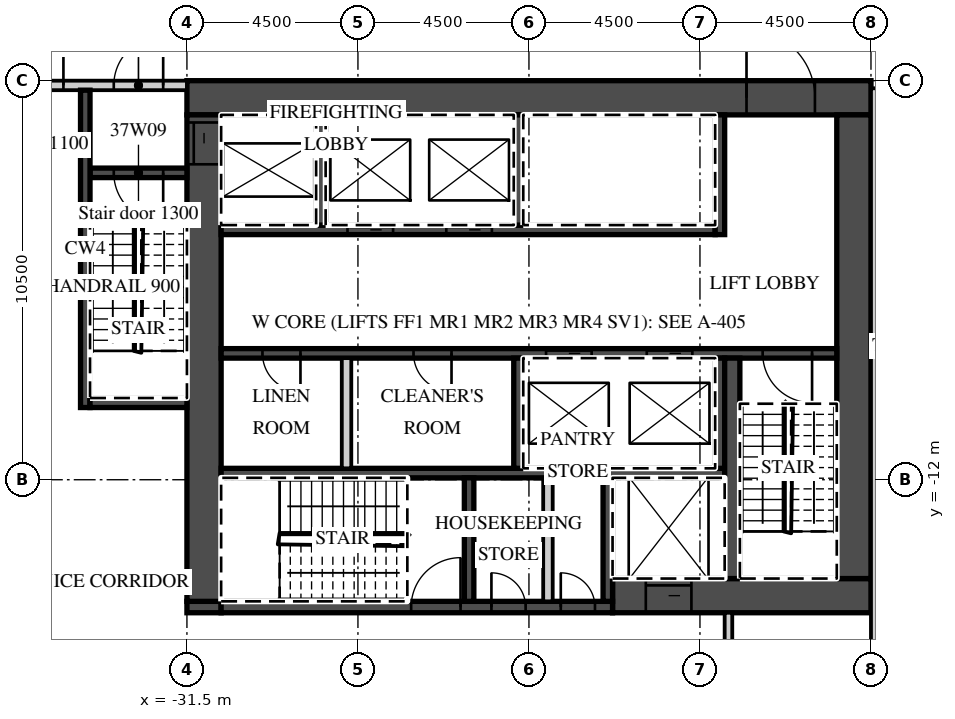
"""IFC4 building model, lengths in metres.
Left out: names, types, materials, properties, quantities, classifications, styles, units other than length and angle.
Written with IfcOpenShell. Run it as: python <this file> out.ifc"""

import sys

from ifc_helpers import new_model, si_unit, direction, frame, frame_2d, origin, place, context, subcontext, project, spatial, rectangle, extrude, element, fill, save


model = new_model("IFC4")
c1 = context("Model", 3, precision=1e-05, world=origin(), true_north=direction((0.0, 1.0)))
c2 = subcontext(c1, "Body", "Model", "MODEL_VIEW")
j1 = project(units=[si_unit("LENGTHUNIT", "METRE"), si_unit("PLANEANGLEUNIT", "RADIAN")], contexts=[c1])
p1 = place(None, origin())
s1 = spatial("IfcSite", under=j1, at=p1, CompositionType="ELEMENT")
p2 = place(p1, origin())
s2 = spatial("IfcBuilding", under=s1, at=p2, CompositionType="ELEMENT")
p3 = place(p2, frame((0.0, 0.0, 162.4)))
s3 = spatial("IfcBuildingStorey", under=s2, at=p3, CompositionType="ELEMENT", Elevation=162.4)
p4 = place(p3, frame((-31.5, -1.95, 0.0), z_axis=(0.0, 0.0, 1.0), x_axis=(1.0, 0.0, 0.0)))
e1 = element("IfcWall", 1, at=p4, inside=s3, PredefinedType="SHEAR", context=c2, shape_type="SweptSolid", body=[
    extrude(rectangle(XDim=18.0, YDim=0.9, at=frame_2d((9.0, 0.0))), origin(), (0.0, 0.0, 1.0), 4.22),
])
p5 = place(p4, frame((14.725, 0.0, 0.0)))
e2 = element("IfcOpeningElement", 2, at=p5, cuts=e1, PredefinedType="OPENING", context=c2, shape_type="SweptSolid", body=[
    extrude(rectangle(XDim=1.8, YDim=2.1, at=frame_2d((0.9, 1.05))), frame((0.0, 0.46, 0.0), z_axis=(0.0, -1.0, 0.0), x_axis=(1.0, 0.0, 0.0)), (0.0, 0.0, 1.0), 0.92),
])
p6 = place(p3, frame((-20.3, -15.05, 0.0), z_axis=(0.0, 0.0, 1.0), x_axis=(1.0, 0.0, 0.0)))
e3 = element("IfcWall", 3, at=p6, inside=s3, PredefinedType="SHEAR", context=c2, shape_type="SweptSolid", body=[
    extrude(rectangle(XDim=6.8, YDim=0.9, at=frame_2d((3.4, 0.0))), origin(), (0.0, 0.0, 1.0), 4.22),
])
p7 = place(p6, frame((0.875, 0.0, 0.0)))
e4 = element("IfcOpeningElement", 4, at=p7, cuts=e3, PredefinedType="OPENING", context=c2, shape_type="SweptSolid", body=[
    extrude(rectangle(XDim=1.2, YDim=2.1, at=frame_2d((0.6, 1.05))), frame((0.0, 0.46, 0.0), z_axis=(0.0, -1.0, 0.0), x_axis=(1.0, 0.0, 0.0)), (0.0, 0.0, 1.0), 0.92),
])
p8 = place(p3, frame((-31.5, -15.35, 0.0), z_axis=(0.0, 0.0, 1.0), x_axis=(1.0, 0.0, 0.0)))
e5 = element("IfcWall", 5, at=p8, inside=s3, PredefinedType="SHEAR", context=c2, shape_type="SweptSolid", body=[
    extrude(rectangle(XDim=0.9, YDim=0.3, at=frame_2d((0.45, 0.0))), origin(), (0.0, 0.0, 1.0), 4.22),
])
p9 = place(p3, frame((-30.6, -15.35, 0.0), z_axis=(0.0, 0.0, 1.0), x_axis=(1.0, 0.0, 0.0)))
e6 = element("IfcWall", 6, at=p9, inside=s3, PredefinedType="SHEAR", context=c2, shape_type="SweptSolid", body=[
    extrude(rectangle(XDim=10.3, YDim=0.3, at=frame_2d((5.15, 0.0))), origin(), (0.0, 0.0, 1.0), 4.22),
])
p10 = place(p9, frame((5.0, 0.0, 0.0)))
e7 = element("IfcOpeningElement", 7, at=p10, cuts=e6, PredefinedType="OPENING", context=c2, shape_type="SweptSolid", body=[
    extrude(rectangle(XDim=1.3, YDim=2.1, at=frame_2d((0.65, 1.05))), frame((0.0, 0.16, 0.0), z_axis=(0.0, -1.0, 0.0), x_axis=(1.0, 0.0, 0.0)), (0.0, 0.0, 1.0), 0.32),
])
p11 = place(p9, frame((7.113, 0.0, 0.0)))
e8 = element("IfcOpeningElement", 8, at=p11, cuts=e6, PredefinedType="OPENING", context=c2, shape_type="SweptSolid", body=[
    extrude(rectangle(XDim=0.9, YDim=2.1, at=frame_2d((0.45, 1.05))), frame((0.0, 0.16, 0.0), z_axis=(0.0, -1.0, 0.0), x_axis=(1.0, 0.0, 0.0)), (0.0, 0.0, 1.0), 0.32),
])
p12 = place(p9, frame((8.938, 0.0, 0.0)))
e9 = element("IfcOpeningElement", 9, at=p12, cuts=e6, PredefinedType="OPENING", context=c2, shape_type="SweptSolid", body=[
    extrude(rectangle(XDim=0.9, YDim=2.1, at=frame_2d((0.45, 1.05))), frame((0.0, 0.16, 0.0), z_axis=(0.0, -1.0, 0.0), x_axis=(1.0, 0.0, 0.0)), (0.0, 0.0, 1.0), 0.32),
])
p13 = place(p3, frame((-31.05, -15.2, 0.0), z_axis=(0.0, 0.0, 1.0), x_axis=(0.0, 1.0, 0.0)))
e10 = element("IfcWall", 10, at=p13, inside=s3, PredefinedType="SHEAR", context=c2, shape_type="SweptSolid", body=[
    extrude(rectangle(XDim=12.8, YDim=0.9, at=frame_2d((6.4, 0.0))), origin(), (0.0, 0.0, 1.0), 4.22),
])
p14 = place(p13, frame((11.5, 0.0, 0.0)))
e11 = element("IfcOpeningElement", 11, at=p14, cuts=e10, PredefinedType="OPENING", context=c2, shape_type="SweptSolid", body=[
    extrude(rectangle(XDim=1.1, YDim=2.1, at=frame_2d((0.55, 1.05))), frame((0.0, 0.46, 0.0), z_axis=(0.0, -1.0, 0.0), x_axis=(1.0, 0.0, 0.0)), (0.0, 0.0, 1.0), 0.92),
])
p15 = place(p3, frame((-13.95, -14.6, 0.0), z_axis=(0.0, 0.0, 1.0), x_axis=(0.0, 1.0, 0.0)))
e12 = element("IfcWall", 12, at=p15, inside=s3, PredefinedType="SHEAR", context=c2, shape_type="SweptSolid", body=[
    extrude(rectangle(XDim=12.2, YDim=0.9, at=frame_2d((6.1, 0.0))), origin(), (0.0, 0.0, 1.0), 4.22),
])
p16 = place(p3, frame((-30.6, -5.425, 0.0), z_axis=(0.0, 0.0, 1.0), x_axis=(1.0, 0.0, 0.0)))
e13 = element("IfcWall", 13, at=p16, inside=s3, PredefinedType="SHEAR", context=c2, shape_type="SweptSolid", body=[
    extrude(rectangle(XDim=13.0, YDim=0.25, at=frame_2d((6.5, 0.0))), origin(), (0.0, 0.0, 1.0), 4.22),
])
p17 = place(p16, frame((3.325, 0.0, 0.0)))
e14 = element("IfcOpeningElement", 14, at=p17, cuts=e13, PredefinedType="OPENING", context=c2, shape_type="SweptSolid", body=[
    extrude(rectangle(XDim=1.2, YDim=2.1, at=frame_2d((0.6, 1.05))), frame((0.0, 0.135, 0.0), z_axis=(0.0, -1.0, 0.0), x_axis=(1.0, 0.0, 0.0)), (0.0, 0.0, 1.0), 0.27),
])
p18 = place(p16, frame((5.925, 0.0, 0.0)))
e15 = element("IfcOpeningElement", 15, at=p18, cuts=e13, PredefinedType="OPENING", context=c2, shape_type="SweptSolid", body=[
    extrude(rectangle(XDim=1.2, YDim=2.1, at=frame_2d((0.6, 1.05))), frame((0.0, 0.135, 0.0), z_axis=(0.0, -1.0, 0.0), x_axis=(1.0, 0.0, 0.0)), (0.0, 0.0, 1.0), 0.27),
])
p19 = place(p3, frame((-17.475, -5.55, 0.0), z_axis=(0.0, 0.0, 1.0), x_axis=(0.0, 1.0, 0.0)))
e16 = element("IfcWall", 16, at=p19, inside=s3, PredefinedType="SHEAR", context=c2, shape_type="SweptSolid", body=[
    extrude(rectangle(XDim=3.15, YDim=0.25, at=frame_2d((1.575, 0.0))), origin(), (0.0, 0.0, 1.0), 4.22),
])
for number, where, z_axis, x_axis in (
    (17, (-27.975, -5.3, 0.0), (0.0, 0.0, 1.0), (0.0, 1.0, 0.0)),
    (18, (-22.775, -5.3, 0.0), (0.0, 0.0, 1.0), (0.0, 1.0, 0.0)),
):
    element("IfcWall", number, at=place(p3, frame(where, z_axis=z_axis, x_axis=x_axis)), inside=s3, PredefinedType="SHEAR", context=c2, shape_type="SweptSolid", body=[
        extrude(rectangle(XDim=2.9, YDim=0.25, at=frame_2d((1.45, 0.0))), origin(), (0.0, 0.0, 1.0), 4.22),
    ])
p20 = place(p3, frame((-30.6, -8.675, 0.0), z_axis=(0.0, 0.0, 1.0), x_axis=(1.0, 0.0, 0.0)))
e19 = element("IfcWall", 19, at=p20, inside=s3, PredefinedType="SHEAR", context=c2, shape_type="SweptSolid", body=[
    extrude(rectangle(XDim=16.2, YDim=0.25, at=frame_2d((8.1, 0.0))), origin(), (0.0, 0.0, 1.0), 4.22),
])
p21 = place(p20, frame((8.55, 0.0, 0.0)))
e20 = element("IfcOpeningElement", 20, at=p21, cuts=e19, PredefinedType="OPENING", context=c2, shape_type="SweptSolid", body=[
    extrude(rectangle(XDim=1.2, YDim=2.1, at=frame_2d((0.6, 1.05))), frame((0.0, 0.135, 0.0), z_axis=(0.0, -1.0, 0.0), x_axis=(1.0, 0.0, 0.0)), (0.0, 0.0, 1.0), 0.27),
])
p22 = place(p20, frame((11.2, 0.0, 0.0)))
e21 = element("IfcOpeningElement", 21, at=p22, cuts=e19, PredefinedType="OPENING", context=c2, shape_type="SweptSolid", body=[
    extrude(rectangle(XDim=1.2, YDim=2.1, at=frame_2d((0.6, 1.05))), frame((0.0, 0.135, 0.0), z_axis=(0.0, -1.0, 0.0), x_axis=(1.0, 0.0, 0.0)), (0.0, 0.0, 1.0), 0.27),
])
p23 = place(p20, frame((14.25, 0.0, 0.0)))
e22 = element("IfcOpeningElement", 22, at=p23, cuts=e19, PredefinedType="OPENING", context=c2, shape_type="SweptSolid", body=[
    extrude(rectangle(XDim=1.3, YDim=2.1, at=frame_2d((0.65, 1.05))), frame((0.0, 0.135, 0.0), z_axis=(0.0, -1.0, 0.0), x_axis=(1.0, 0.0, 0.0)), (0.0, 0.0, 1.0), 0.27),
])
p24 = place(p20, frame((1.087, 0.0, 0.0)))
e23 = element("IfcOpeningElement", 23, at=p24, cuts=e19, PredefinedType="OPENING", context=c2, shape_type="SweptSolid", body=[
    extrude(rectangle(XDim=1.0, YDim=2.1, at=frame_2d((0.5, 1.05))), frame((0.0, 0.135, 0.0), z_axis=(0.0, -1.0, 0.0), x_axis=(1.0, 0.0, 0.0)), (0.0, 0.0, 1.0), 0.27),
])
p25 = place(p20, frame((5.062, 0.0, 0.0)))
e24 = element("IfcOpeningElement", 24, at=p25, cuts=e19, PredefinedType="OPENING", context=c2, shape_type="SweptSolid", body=[
    extrude(rectangle(XDim=1.0, YDim=2.1, at=frame_2d((0.5, 1.05))), frame((0.0, 0.135, 0.0), z_axis=(0.0, -1.0, 0.0), x_axis=(1.0, 0.0, 0.0)), (0.0, 0.0, 1.0), 0.27),
])
p26 = place(p3, frame((-30.6, -11.825, 0.0), z_axis=(0.0, 0.0, 1.0), x_axis=(1.0, 0.0, 0.0)))
e25 = element("IfcWall", 25, at=p26, inside=s3, PredefinedType="SHEAR", context=c2, shape_type="SweptSolid", body=[
    extrude(rectangle(XDim=13.25, YDim=0.25, at=frame_2d((6.625, 0.0))), origin(), (0.0, 0.0, 1.0), 4.22),
])
for number, where, z_axis, x_axis in (
    (26, (-17.475, -11.7, 0.0), (0.0, 0.0, 1.0), (0.0, 1.0, 0.0)),
    (27, (-22.775, -11.7, 0.0), (0.0, 0.0, 1.0), (0.0, 1.0, 0.0)),
):
    element("IfcWall", number, at=place(p3, frame(where, z_axis=z_axis, x_axis=x_axis)), inside=s3, PredefinedType="SHEAR", context=c2, shape_type="SweptSolid", body=[
        extrude(rectangle(XDim=2.9, YDim=0.25, at=frame_2d((1.45, 0.0))), origin(), (0.0, 0.0, 1.0), 4.22),
    ])
p27 = place(p3, frame((-27.3, -11.7, 0.0), z_axis=(0.0, 0.0, 1.0), x_axis=(0.0, 1.0, 0.0)))
e28 = element("IfcWall", 28, at=p27, inside=s3, PredefinedType="PARTITIONING", context=c2, shape_type="SweptSolid", body=[
    extrude(rectangle(XDim=2.9, YDim=0.25, at=frame_2d((1.45, 0.0))), origin(), (0.0, 0.0, 1.0), 4.22),
])
p28 = place(p3, frame((-17.15, -14.6, 0.0), z_axis=(0.0, 0.0, 1.0), x_axis=(0.0, 1.0, 0.0)))
e29 = element("IfcWall", 29, at=p28, inside=s3, PredefinedType="SHEAR", context=c2, shape_type="SweptSolid", body=[
    extrude(rectangle(XDim=5.8, YDim=0.4, at=frame_2d((2.9, 0.0))), origin(), (0.0, 0.0, 1.0), 4.22),
])
for number, where, z_axis, x_axis in (
    (30, (-20.425, -15.2, 0.0), (0.0, 0.0, 1.0), (0.0, 1.0, 0.0)),
    (31, (-24.075, -15.2, 0.0), (0.0, 0.0, 1.0), (0.0, 1.0, 0.0)),
):
    element("IfcWall", number, at=place(p3, frame(where, z_axis=z_axis, x_axis=x_axis)), inside=s3, PredefinedType="SHEAR", context=c2, shape_type="SweptSolid", body=[
        extrude(rectangle(XDim=3.25, YDim=0.25, at=frame_2d((1.625, 0.0))), origin(), (0.0, 0.0, 1.0), 4.22),
    ])
p29 = place(p3, frame((-22.0, -15.2, 0.0), z_axis=(0.0, 0.0, 1.0), x_axis=(0.0, 1.0, 0.0)))
e32 = element("IfcWall", 32, at=p29, inside=s3, PredefinedType="PARTITIONING", context=c2, shape_type="SweptSolid", body=[
    extrude(rectangle(XDim=3.25, YDim=0.25, at=frame_2d((1.625, 0.0))), origin(), (0.0, 0.0, 1.0), 4.22),
])
p30 = place(p3, frame((-42.933, -1.625, 0.0), z_axis=(0.0, 0.0, 1.0), x_axis=(1.0, 0.0, 0.0)))
e33 = element("IfcWall", 33, at=p30, inside=s3, PredefinedType="PARTITIONING", context=c2, shape_type="SweptSolid", body=[
    extrude(rectangle(XDim=11.433, YDim=0.25, at=frame_2d((5.716, 0.0))), origin(), (0.0, 0.0, 1.0), 4.22),
])
p31 = place(p30, frame((9.508, 0.0, 0.0)))
e34 = element("IfcOpeningElement", 34, at=p31, cuts=e33, PredefinedType="OPENING", context=c2, shape_type="SweptSolid", body=[
    extrude(rectangle(XDim=1.3, YDim=2.1, at=frame_2d((0.65, 1.05))), frame((0.0, 0.135, 0.0), z_axis=(0.0, -1.0, 0.0), x_axis=(1.0, 0.0, 0.0)), (0.0, 0.0, 1.0), 0.27),
])
p32 = place(p30, frame((7.083, 0.0, 0.0)))
e35 = element("IfcOpeningElement", 35, at=p32, cuts=e33, PredefinedType="OPENING", context=c2, shape_type="SweptSolid", body=[
    extrude(rectangle(XDim=1.1, YDim=2.1, at=frame_2d((0.55, 1.05))), frame((0.0, 0.135, 0.0), z_axis=(0.0, -1.0, 0.0), x_axis=(1.0, 0.0, 0.0)), (0.0, 0.0, 1.0), 0.27),
])
p33 = place(p3, frame((-34.05, -3.925, 0.0), z_axis=(0.0, 0.0, 1.0), x_axis=(1.0, 0.0, 0.0)))
e36 = element("IfcWall", 36, at=p33, inside=s3, PredefinedType="SHEAR", context=c2, shape_type="SweptSolid", body=[
    extrude(rectangle(XDim=2.55, YDim=0.25, at=frame_2d((1.275, 0.0))), origin(), (0.0, 0.0, 1.0), 4.22),
])
p34 = place(p33, frame((0.625, 0.0, 0.0)))
e37 = element("IfcOpeningElement", 37, at=p34, cuts=e36, PredefinedType="OPENING", context=c2, shape_type="SweptSolid", body=[
    extrude(rectangle(XDim=1.3, YDim=2.1, at=frame_2d((0.65, 1.05))), frame((0.0, 0.135, 0.0), z_axis=(0.0, -1.0, 0.0), x_axis=(1.0, 0.0, 0.0)), (0.0, 0.0, 1.0), 0.27),
])
p35 = place(p3, frame((-34.175, -10.1, 0.0), z_axis=(0.0, 0.0, 1.0), x_axis=(0.0, 1.0, 0.0)))
e38 = element("IfcWall", 38, at=p35, inside=s3, PredefinedType="SHEAR", context=c2, shape_type="SweptSolid", body=[
    extrude(rectangle(XDim=8.35, YDim=0.25, at=frame_2d((4.175, 0.0))), origin(), (0.0, 0.0, 1.0), 4.22),
])
p36 = place(p3, frame((-34.05, -9.975, 0.0), z_axis=(0.0, 0.0, 1.0), x_axis=(1.0, 0.0, 0.0)))
e39 = element("IfcWall", 39, at=p36, inside=s3, PredefinedType="SHEAR", context=c2, shape_type="SweptSolid", body=[
    extrude(rectangle(XDim=2.55, YDim=0.25, at=frame_2d((1.275, 0.0))), origin(), (0.0, 0.0, 1.0), 4.22),
])
p37 = place(p3, frame((-17.25, -17.7, 0.0), z_axis=(0.0, 0.0, 1.0), x_axis=(0.0, 1.0, 0.0)))
e40 = element("IfcWall", 40, at=p37, inside=s3, PredefinedType="PARTITIONING", context=c2, shape_type="SweptSolid", body=[
    extrude(rectangle(XDim=2.2, YDim=0.2, at=frame_2d((1.1, 0.0))), origin(), (0.0, 0.0, 1.0), 4.22),
])
p38 = place(p3, frame((-13.4, -22.592, 0.0), z_axis=(0.0, 0.0, 1.0), x_axis=(0.0, 1.0, 0.0)))
e41 = element("IfcWall", 41, at=p38, inside=s3, PredefinedType="PARTITIONING", context=c2, shape_type="SweptSolid", body=[
    extrude(rectangle(XDim=20.892, YDim=0.2, at=frame_2d((10.446, 0.0))), origin(), (0.0, 0.0, 1.0), 4.22),
])
p39 = place(p21, origin())
e42 = element("IfcDoor", 42, at=p39, inside=s3, OperationType="SLIDING_TO_LEFT", PredefinedType="DOOR", context=c2, shape_type="SweptSolid", body=[
    extrude(rectangle(XDim=1.2, YDim=2.1, at=frame_2d((0.6, 1.05))), frame((0.0, 0.025, 0.0), z_axis=(0.0, -1.0, 0.0), x_axis=(1.0, 0.0, 0.0)), (0.0, 0.0, 1.0), 0.05),
])
fill(e20, e42)
p40 = place(p22, origin())
e43 = element("IfcDoor", 43, at=p40, inside=s3, OperationType="SLIDING_TO_RIGHT", PredefinedType="DOOR", context=c2, shape_type="SweptSolid", body=[
    extrude(rectangle(XDim=1.2, YDim=2.1, at=frame_2d((0.6, 1.05))), frame((0.0, 0.025, 0.0), z_axis=(0.0, -1.0, 0.0), x_axis=(1.0, 0.0, 0.0)), (0.0, 0.0, 1.0), 0.05),
])
fill(e21, e43)
p41 = place(p17, origin())
e44 = element("IfcDoor", 44, at=p41, inside=s3, OperationType="SLIDING_TO_RIGHT", PredefinedType="DOOR", context=c2, shape_type="SweptSolid", body=[
    extrude(rectangle(XDim=1.2, YDim=2.1, at=frame_2d((0.6, 1.05))), frame((0.0, 0.025, 0.0), z_axis=(0.0, -1.0, 0.0), x_axis=(1.0, 0.0, 0.0)), (0.0, 0.0, 1.0), 0.05),
])
fill(e14, e44)
p42 = place(p18, origin())
e45 = element("IfcDoor", 45, at=p42, inside=s3, OperationType="SLIDING_TO_RIGHT", PredefinedType="DOOR", context=c2, shape_type="SweptSolid", body=[
    extrude(rectangle(XDim=1.2, YDim=2.1, at=frame_2d((0.6, 1.05))), frame((0.0, 0.025, 0.0), z_axis=(0.0, -1.0, 0.0), x_axis=(1.0, 0.0, 0.0)), (0.0, 0.0, 1.0), 0.05),
])
fill(e15, e45)
p43 = place(p7, origin())
e46 = element("IfcDoor", 46, at=p43, inside=s3, OperationType="SLIDING_TO_LEFT", PredefinedType="DOOR", context=c2, shape_type="SweptSolid", body=[
    extrude(rectangle(XDim=1.2, YDim=2.1, at=frame_2d((0.6, 1.05))), frame((0.0, 0.025, 0.0), z_axis=(0.0, -1.0, 0.0), x_axis=(1.0, 0.0, 0.0)), (0.0, 0.0, 1.0), 0.05),
])
fill(e4, e46)
p44 = place(p14, origin())
e47 = element("IfcDoor", 47, at=p44, inside=s3, OperationType="SLIDING_TO_RIGHT", PredefinedType="DOOR", context=c2, shape_type="SweptSolid", body=[
    extrude(rectangle(XDim=1.1, YDim=2.1, at=frame_2d((0.55, 1.05))), frame((0.0, 0.025, 0.0), z_axis=(0.0, -1.0, 0.0), x_axis=(1.0, 0.0, 0.0)), (0.0, 0.0, 1.0), 0.05),
])
fill(e11, e47)
p45 = place(p5, origin())
e48 = element("IfcDoor", 48, at=p45, inside=s3, OperationType="DOUBLE_DOOR_DOUBLE_SWING", PredefinedType="DOOR", context=c2, shape_type="SweptSolid", body=[
    extrude(rectangle(XDim=1.8, YDim=2.1, at=frame_2d((0.9, 1.05))), frame((0.0, 0.025, 0.0), z_axis=(0.0, -1.0, 0.0), x_axis=(1.0, 0.0, 0.0)), (0.0, 0.0, 1.0), 0.05),
])
fill(e2, e48)
p46 = place(p31, origin())
e49 = element("IfcDoor", 49, at=p46, inside=s3, OperationType="SINGLE_SWING_RIGHT", PredefinedType="DOOR", context=c2, shape_type="SweptSolid", body=[
    extrude(rectangle(XDim=1.3, YDim=2.1, at=frame_2d((0.65, 1.05))), frame((0.0, 0.025, 0.0), z_axis=(0.0, -1.0, 0.0), x_axis=(1.0, 0.0, 0.0)), (0.0, 0.0, 1.0), 0.05),
])
fill(e34, e49)
p47 = place(p34, origin())
e50 = element("IfcDoor", 50, at=p47, inside=s3, OperationType="SINGLE_SWING_RIGHT", PredefinedType="DOOR", context=c2, shape_type="SweptSolid", body=[
    extrude(rectangle(XDim=1.3, YDim=2.1, at=frame_2d((0.65, 1.05))), frame((0.0, 0.025, 0.0), z_axis=(0.0, -1.0, 0.0), x_axis=(1.0, 0.0, 0.0)), (0.0, 0.0, 1.0), 0.05),
])
fill(e37, e50)
p48 = place(p32, origin())
e51 = element("IfcDoor", 51, at=p48, inside=s3, OperationType="SINGLE_SWING_RIGHT", PredefinedType="DOOR", context=c2, shape_type="SweptSolid", body=[
    extrude(rectangle(XDim=1.1, YDim=2.1, at=frame_2d((0.55, 1.05))), frame((0.0, 0.025, 0.0), z_axis=(0.0, -1.0, 0.0), x_axis=(1.0, 0.0, 0.0)), (0.0, 0.0, 1.0), 0.05),
])
fill(e35, e51)
p49 = place(p23, origin())
e52 = element("IfcDoor", 52, at=p49, inside=s3, OperationType="SINGLE_SWING_RIGHT", PredefinedType="DOOR", context=c2, shape_type="SweptSolid", body=[
    extrude(rectangle(XDim=1.3, YDim=2.1, at=frame_2d((0.65, 1.05))), frame((0.0, 0.025, 0.0), z_axis=(0.0, -1.0, 0.0), x_axis=(1.0, 0.0, 0.0)), (0.0, 0.0, 1.0), 0.05),
])
fill(e22, e52)
p50 = place(p10, origin())
e53 = element("IfcDoor", 53, at=p50, inside=s3, OperationType="SINGLE_SWING_RIGHT", PredefinedType="DOOR", context=c2, shape_type="SweptSolid", body=[
    extrude(rectangle(XDim=1.3, YDim=2.1, at=frame_2d((0.65, 1.05))), frame((0.0, 0.025, 0.0), z_axis=(0.0, -1.0, 0.0), x_axis=(1.0, 0.0, 0.0)), (0.0, 0.0, 1.0), 0.05),
])
fill(e7, e53)
p51 = place(p11, origin())
e54 = element("IfcDoor", 54, at=p51, inside=s3, OperationType="SINGLE_SWING_LEFT", PredefinedType="DOOR", context=c2, shape_type="SweptSolid", body=[
    extrude(rectangle(XDim=0.9, YDim=2.1, at=frame_2d((0.45, 1.05))), frame((0.0, 0.025, 0.0), z_axis=(0.0, -1.0, 0.0), x_axis=(1.0, 0.0, 0.0)), (0.0, 0.0, 1.0), 0.05),
])
fill(e8, e54)
p52 = place(p12, origin())
e55 = element("IfcDoor", 55, at=p52, inside=s3, OperationType="SINGLE_SWING_LEFT", PredefinedType="DOOR", context=c2, shape_type="SweptSolid", body=[
    extrude(rectangle(XDim=0.9, YDim=2.1, at=frame_2d((0.45, 1.05))), frame((0.0, 0.025, 0.0), z_axis=(0.0, -1.0, 0.0), x_axis=(1.0, 0.0, 0.0)), (0.0, 0.0, 1.0), 0.05),
])
fill(e9, e55)
p53 = place(p24, origin())
e56 = element("IfcDoor", 56, at=p53, inside=s3, OperationType="SINGLE_SWING_RIGHT", PredefinedType="DOOR", context=c2, shape_type="SweptSolid", body=[
    extrude(rectangle(XDim=1.0, YDim=2.1, at=frame_2d((0.5, 1.05))), frame((0.0, 0.025, 0.0), z_axis=(0.0, -1.0, 0.0), x_axis=(1.0, 0.0, 0.0)), (0.0, 0.0, 1.0), 0.05),
])
fill(e23, e56)
p54 = place(p25, origin())
e57 = element("IfcDoor", 57, at=p54, inside=s3, OperationType="SINGLE_SWING_RIGHT", PredefinedType="DOOR", context=c2, shape_type="SweptSolid", body=[
    extrude(rectangle(XDim=1.0, YDim=2.1, at=frame_2d((0.5, 1.05))), frame((0.0, 0.025, 0.0), z_axis=(0.0, -1.0, 0.0), x_axis=(1.0, 0.0, 0.0)), (0.0, 0.0, 1.0), 0.05),
])
fill(e24, e57)
save(model, sys.argv[1])
